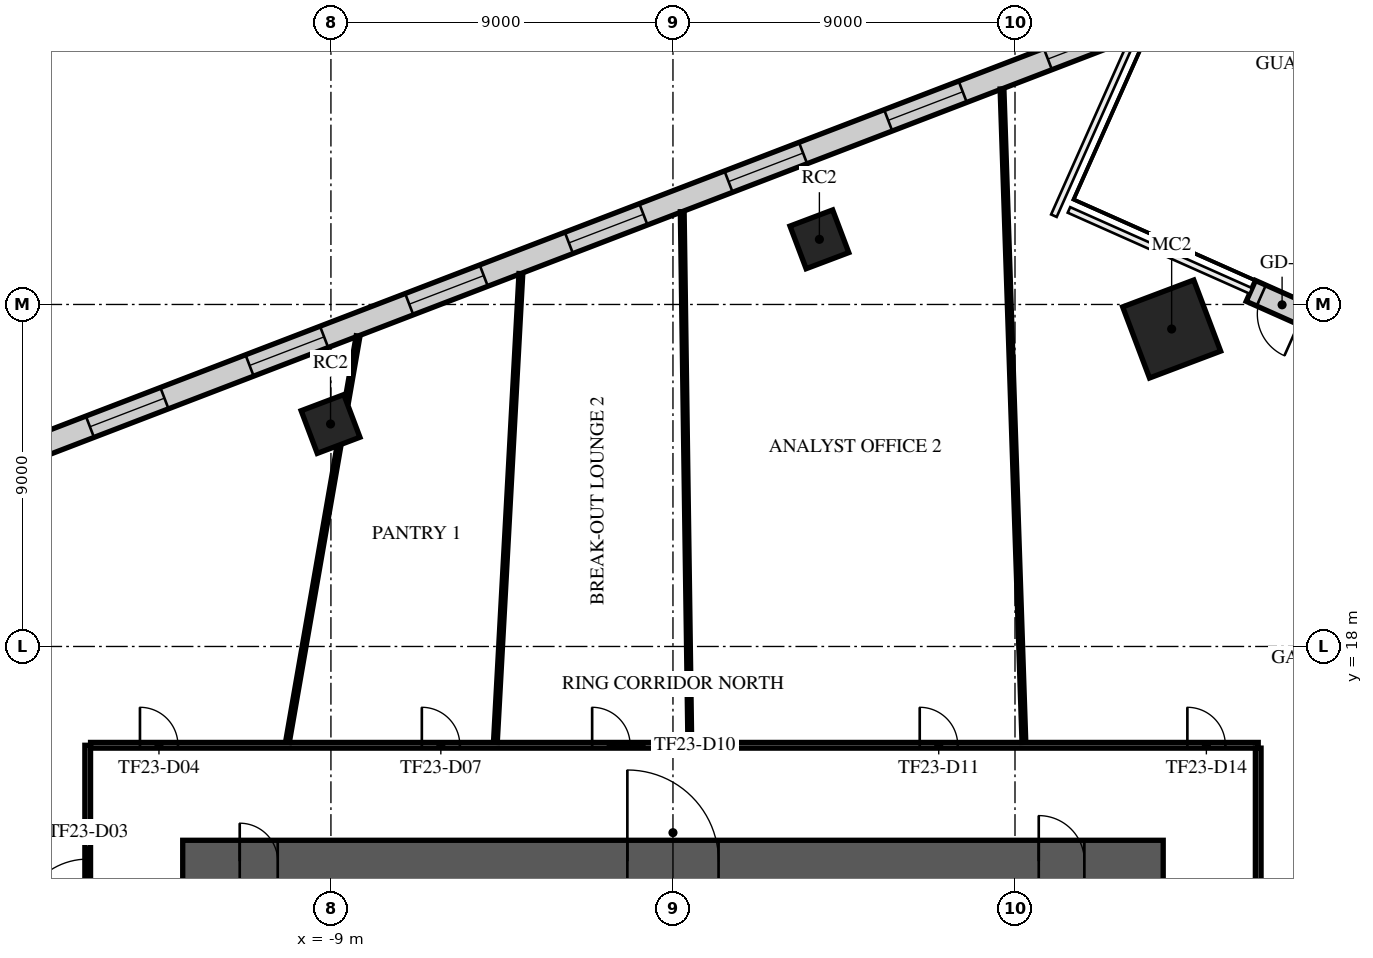
"""IFC4 building model, lengths in metres.
Left out: names, types, materials, properties, quantities, classifications, styles, units other than length and angle.
Written with IfcOpenShell. Run it as: python <this file> out.ifc"""

import sys

from ifc_helpers import new_model, si_unit, direction, frame, frame_2d, origin, origin_2d, place, context, subcontext, project, spatial, rectangle, extrude, element, fill, save


model = new_model("IFC4")
c1 = context("Model", 3, precision=1e-05, world=origin(), true_north=direction((0.0, 1.0)))
c2 = subcontext(c1, "Body", "Model", "MODEL_VIEW")
j1 = project(units=[si_unit("LENGTHUNIT", "METRE"), si_unit("PLANEANGLEUNIT", "RADIAN")], contexts=[c1])
p1 = place(None, origin())
s1 = spatial("IfcSite", under=j1, at=p1, CompositionType="ELEMENT")
p2 = place(p1, origin())
s2 = spatial("IfcBuilding", under=s1, at=p2, CompositionType="ELEMENT")
p3 = place(p2, frame((0.0, 0.0, 102.1)))
s3 = spatial("IfcBuildingStorey", under=s2, at=p3, CompositionType="ELEMENT", Elevation=102.1)
p4 = place(p3, frame((13.122, 26.354, 0.0), z_axis=(0.0, 0.0, 1.0), x_axis=(0.935491525991, 0.353349125935, 0.0)))
e1 = element("IfcColumn", 1, at=p4, inside=s3, PredefinedType="COLUMN", context=c2, shape_type="SweptSolid", body=[
    extrude(rectangle(XDim=2.0, YDim=2.0, at=origin_2d()), origin(), (0.0, 0.0, 1.0), 4.0),
])
for number, where, z_axis, x_axis in (
    (2, (3.853, 28.714, 0.0), (0.0, 0.0, 1.0), (0.935, 0.353, 0.0)),
    (3, (-9.01, 23.855, 0.0), (0.0, 0.0, 1.0), (0.935, 0.353, 0.0)),
):
    element("IfcColumn", number, at=place(p3, frame(where, z_axis=z_axis, x_axis=x_axis)), inside=s3, PredefinedType="COLUMN", context=c2, shape_type="SweptSolid", body=[
        extrude(rectangle(XDim=1.2, YDim=1.2, at=origin_2d()), origin(), (0.0, 0.0, 1.0), 4.0),
    ])
p5 = place(p3, frame((-12.9, 12.35, 0.0), z_axis=(0.0, 0.0, 1.0), x_axis=(1.0, 0.0, 0.0)))
e4 = element("IfcWall", 4, at=p5, inside=s3, PredefinedType="SHEAR", context=c2, shape_type="SweptSolid", body=[
    extrude(rectangle(XDim=25.8, YDim=1.1, at=frame_2d((12.9, 0.0))), origin(), (0.0, 0.0, 1.0), 3.58),
])
p6 = place(p5, frame((11.7, 0.0, 0.0)))
e5 = element("IfcOpeningElement", 5, at=p6, cuts=e4, PredefinedType="OPENING", context=c2, shape_type="SweptSolid", body=[
    extrude(rectangle(XDim=2.4, YDim=2.4, at=frame_2d((1.2, 1.2))), frame((0.0, 0.56, 0.0), z_axis=(0.0, -1.0, 0.0), x_axis=(1.0, 0.0, 0.0)), (0.0, 0.0, 1.0), 1.12),
])
p7 = place(p5, frame((22.525, 0.0, 0.0)))
e6 = element("IfcOpeningElement", 6, at=p7, cuts=e4, PredefinedType="OPENING", context=c2, shape_type="SweptSolid", body=[
    extrude(rectangle(XDim=1.2, YDim=2.1, at=frame_2d((0.6, 1.05))), frame((0.0, 0.56, 0.0), z_axis=(0.0, -1.0, 0.0), x_axis=(1.0, 0.0, 0.0)), (0.0, 0.0, 1.0), 1.12),
])
p8 = place(p5, frame((1.5, 0.0, 0.0)))
e7 = element("IfcOpeningElement", 7, at=p8, cuts=e4, PredefinedType="OPENING", context=c2, shape_type="SweptSolid", body=[
    extrude(rectangle(XDim=1.0, YDim=2.1, at=frame_2d((0.5, 1.05))), frame((0.0, 0.56, 0.0), z_axis=(0.0, -1.0, 0.0), x_axis=(1.0, 0.0, 0.0)), (0.0, 0.0, 1.0), 1.12),
])
p9 = place(p3, frame((12.946, 34.64, 0.0), z_axis=(0.0, 0.0, 1.0), x_axis=(-0.933581036022, -0.358366361675, 0.0)))
e8 = element("IfcWall", 8, at=p9, inside=s3, PredefinedType="STANDARD", context=c2, shape_type="SweptSolid", body=[
    extrude(rectangle(XDim=49.376, YDim=0.6, at=frame_2d((24.688, 0.0))), origin(), (0.0, 0.0, 1.0), 3.58),
])
p10 = place(p9, frame((1.2, 0.0, 0.9)))
e9 = element("IfcOpeningElement", 9, at=p10, cuts=e8, PredefinedType="OPENING", context=c2, shape_type="SweptSolid", body=[
    extrude(rectangle(XDim=2.1, YDim=2.1, at=frame_2d((1.05, 1.05))), frame((0.0, 0.31, 0.0), z_axis=(0.0, -1.0, 0.0), x_axis=(1.0, 0.0, 0.0)), (0.0, 0.0, 1.0), 0.62),
])
p11 = place(p9, frame((5.7, 0.0, 0.9)))
e10 = element("IfcOpeningElement", 10, at=p11, cuts=e8, PredefinedType="OPENING", context=c2, shape_type="SweptSolid", body=[
    extrude(rectangle(XDim=2.1, YDim=2.1, at=frame_2d((1.05, 1.05))), frame((0.0, 0.31, 0.0), z_axis=(0.0, -1.0, 0.0), x_axis=(1.0, 0.0, 0.0)), (0.0, 0.0, 1.0), 0.62),
])
p12 = place(p9, frame((10.2, 0.0, 0.9)))
e11 = element("IfcOpeningElement", 11, at=p12, cuts=e8, PredefinedType="OPENING", context=c2, shape_type="SweptSolid", body=[
    extrude(rectangle(XDim=2.1, YDim=2.1, at=frame_2d((1.05, 1.05))), frame((0.0, 0.31, 0.0), z_axis=(0.0, -1.0, 0.0), x_axis=(1.0, 0.0, 0.0)), (0.0, 0.0, 1.0), 0.62),
])
p13 = place(p9, frame((14.7, 0.0, 0.9)))
e12 = element("IfcOpeningElement", 12, at=p13, cuts=e8, PredefinedType="OPENING", context=c2, shape_type="SweptSolid", body=[
    extrude(rectangle(XDim=2.1, YDim=2.1, at=frame_2d((1.05, 1.05))), frame((0.0, 0.31, 0.0), z_axis=(0.0, -1.0, 0.0), x_axis=(1.0, 0.0, 0.0)), (0.0, 0.0, 1.0), 0.62),
])
p14 = place(p9, frame((19.2, 0.0, 0.9)))
e13 = element("IfcOpeningElement", 13, at=p14, cuts=e8, PredefinedType="OPENING", context=c2, shape_type="SweptSolid", body=[
    extrude(rectangle(XDim=2.1, YDim=2.1, at=frame_2d((1.05, 1.05))), frame((0.0, 0.31, 0.0), z_axis=(0.0, -1.0, 0.0), x_axis=(1.0, 0.0, 0.0)), (0.0, 0.0, 1.0), 0.62),
])
p15 = place(p9, frame((23.7, 0.0, 0.9)))
e14 = element("IfcOpeningElement", 14, at=p15, cuts=e8, PredefinedType="OPENING", context=c2, shape_type="SweptSolid", body=[
    extrude(rectangle(XDim=2.1, YDim=2.1, at=frame_2d((1.05, 1.05))), frame((0.0, 0.31, 0.0), z_axis=(0.0, -1.0, 0.0), x_axis=(1.0, 0.0, 0.0)), (0.0, 0.0, 1.0), 0.62),
])
p16 = place(p9, frame((28.2, 0.0, 0.9)))
e15 = element("IfcOpeningElement", 15, at=p16, cuts=e8, PredefinedType="OPENING", context=c2, shape_type="SweptSolid", body=[
    extrude(rectangle(XDim=2.1, YDim=2.1, at=frame_2d((1.05, 1.05))), frame((0.0, 0.31, 0.0), z_axis=(0.0, -1.0, 0.0), x_axis=(1.0, 0.0, 0.0)), (0.0, 0.0, 1.0), 0.62),
])
p17 = place(p9, frame((32.7, 0.0, 0.9)))
e16 = element("IfcOpeningElement", 16, at=p17, cuts=e8, PredefinedType="OPENING", context=c2, shape_type="SweptSolid", body=[
    extrude(rectangle(XDim=2.1, YDim=2.1, at=frame_2d((1.05, 1.05))), frame((0.0, 0.31, 0.0), z_axis=(0.0, -1.0, 0.0), x_axis=(1.0, 0.0, 0.0)), (0.0, 0.0, 1.0), 0.62),
])
p18 = place(p9, frame((37.2, 0.0, 0.9)))
e17 = element("IfcOpeningElement", 17, at=p18, cuts=e8, PredefinedType="OPENING", context=c2, shape_type="SweptSolid", body=[
    extrude(rectangle(XDim=2.1, YDim=2.1, at=frame_2d((1.05, 1.05))), frame((0.0, 0.31, 0.0), z_axis=(0.0, -1.0, 0.0), x_axis=(1.0, 0.0, 0.0)), (0.0, 0.0, 1.0), 0.62),
])
p19 = place(p9, frame((41.7, 0.0, 0.9)))
e18 = element("IfcOpeningElement", 18, at=p19, cuts=e8, PredefinedType="OPENING", context=c2, shape_type="SweptSolid", body=[
    extrude(rectangle(XDim=2.1, YDim=2.1, at=frame_2d((1.05, 1.05))), frame((0.0, 0.31, 0.0), z_axis=(0.0, -1.0, 0.0), x_axis=(1.0, 0.0, 0.0)), (0.0, 0.0, 1.0), 0.62),
])
p20 = place(p9, frame((46.138, 0.0, 0.9)))
e19 = element("IfcOpeningElement", 19, at=p20, cuts=e8, PredefinedType="OPENING", context=c2, shape_type="SweptSolid", body=[
    extrude(rectangle(XDim=2.1, YDim=2.1, at=frame_2d((1.05, 1.05))), frame((0.0, 0.31, 0.0), z_axis=(0.0, -1.0, 0.0), x_axis=(1.0, 0.0, 0.0)), (0.0, 0.0, 1.0), 0.62),
])
p21 = place(p3, frame((16.85, 26.625, 0.0), z_axis=(0.0, 0.0, 1.0), x_axis=(-0.913598891005, 0.406616608556, 0.0)))
e20 = element("IfcWall", 20, at=p21, inside=s3, PredefinedType="STANDARD", context=c2, shape_type="SweptSolid", body=[
    extrude(rectangle(XDim=1.8, YDim=0.6, at=frame_2d((0.9, 0.0))), origin(), (0.0, 0.0, 1.0), 3.58),
])
p22 = place(p21, frame((0.3, 0.0, 0.0)))
e21 = element("IfcOpeningElement", 21, at=p22, cuts=e20, PredefinedType="OPENING", context=c2, shape_type="SweptSolid", body=[
    extrude(rectangle(XDim=1.2, YDim=2.4, at=frame_2d((0.6, 1.2))), frame((0.0, 0.31, 0.0), z_axis=(0.0, -1.0, 0.0), x_axis=(1.0, 0.0, 0.0)), (0.0, 0.0, 1.0), 0.62),
])
p23 = place(p3, frame((-15.4, -15.4, 0.0), z_axis=(0.0, 0.0, 1.0), x_axis=(0.0, 1.0, 0.0)))
e22 = element("IfcWall", 22, at=p23, inside=s3, PredefinedType="PARTITIONING", context=c2, shape_type="SweptSolid", body=[
    extrude(rectangle(XDim=30.8, YDim=0.15, at=frame_2d((15.4, 0.0))), origin(), (0.0, 0.0, 1.0), 3.08),
])
p24 = place(p23, frame((21.999, 0.0, 0.0)))
e23 = element("IfcOpeningElement", 23, at=p24, cuts=e22, PredefinedType="OPENING", context=c2, shape_type="SweptSolid", body=[
    extrude(rectangle(XDim=1.0, YDim=2.1, at=frame_2d((0.5, 1.05))), frame((0.0, 0.085, 0.0), z_axis=(0.0, -1.0, 0.0), x_axis=(1.0, 0.0, 0.0)), (0.0, 0.0, 1.0), 0.17),
])
p25 = place(p23, frame((11.518, 0.0, 0.0)))
e24 = element("IfcOpeningElement", 24, at=p25, cuts=e22, PredefinedType="OPENING", context=c2, shape_type="SweptSolid", body=[
    extrude(rectangle(XDim=1.0, YDim=2.1, at=frame_2d((0.5, 1.05))), frame((0.0, 0.085, 0.0), z_axis=(0.0, -1.0, 0.0), x_axis=(1.0, 0.0, 0.0)), (0.0, 0.0, 1.0), 0.17),
])
p26 = place(p23, frame((26.005, 0.0, 0.0)))
e25 = element("IfcOpeningElement", 25, at=p26, cuts=e22, PredefinedType="OPENING", context=c2, shape_type="SweptSolid", body=[
    extrude(rectangle(XDim=1.8, YDim=2.1, at=frame_2d((0.9, 1.05))), frame((0.0, 0.085, 0.0), z_axis=(0.0, -1.0, 0.0), x_axis=(1.0, 0.0, 0.0)), (0.0, 0.0, 1.0), 0.17),
])
p27 = place(p23, frame((6.3, 0.0, 0.0)))
e26 = element("IfcOpeningElement", 26, at=p27, cuts=e22, PredefinedType="OPENING", context=c2, shape_type="SweptSolid", body=[
    extrude(rectangle(XDim=1.0, YDim=2.1, at=frame_2d((0.5, 1.05))), frame((0.0, 0.085, 0.0), z_axis=(0.0, -1.0, 0.0), x_axis=(1.0, 0.0, 0.0)), (0.0, 0.0, 1.0), 0.17),
])
p28 = place(p3, frame((-15.325, 15.4, 0.0), z_axis=(0.0, 0.0, 1.0), x_axis=(1.0, 0.0, 0.0)))
e27 = element("IfcWall", 27, at=p28, inside=s3, PredefinedType="PARTITIONING", context=c2, shape_type="SweptSolid", body=[
    extrude(rectangle(XDim=30.725, YDim=0.15, at=frame_2d((15.362, 0.0))), origin(), (0.0, 0.0, 1.0), 3.08),
])
p29 = place(p28, frame((1.3, 0.0, 0.0)))
e28 = element("IfcOpeningElement", 28, at=p29, cuts=e27, PredefinedType="OPENING", context=c2, shape_type="SweptSolid", body=[
    extrude(rectangle(XDim=1.0, YDim=2.1, at=frame_2d((0.5, 1.05))), frame((0.0, 0.085, 0.0), z_axis=(0.0, -1.0, 0.0), x_axis=(1.0, 0.0, 0.0)), (0.0, 0.0, 1.0), 0.17),
])
p30 = place(p28, frame((8.717, 0.0, 0.0)))
e29 = element("IfcOpeningElement", 29, at=p30, cuts=e27, PredefinedType="OPENING", context=c2, shape_type="SweptSolid", body=[
    extrude(rectangle(XDim=1.0, YDim=2.1, at=frame_2d((0.5, 1.05))), frame((0.0, 0.085, 0.0), z_axis=(0.0, -1.0, 0.0), x_axis=(1.0, 0.0, 0.0)), (0.0, 0.0, 1.0), 0.17),
])
p31 = place(p28, frame((13.198, 0.0, 0.0)))
e30 = element("IfcOpeningElement", 30, at=p31, cuts=e27, PredefinedType="OPENING", context=c2, shape_type="SweptSolid", body=[
    extrude(rectangle(XDim=1.0, YDim=2.1, at=frame_2d((0.5, 1.05))), frame((0.0, 0.085, 0.0), z_axis=(0.0, -1.0, 0.0), x_axis=(1.0, 0.0, 0.0)), (0.0, 0.0, 1.0), 0.17),
])
p32 = place(p28, frame((21.818, 0.0, 0.0)))
e31 = element("IfcOpeningElement", 31, at=p32, cuts=e27, PredefinedType="OPENING", context=c2, shape_type="SweptSolid", body=[
    extrude(rectangle(XDim=1.0, YDim=2.1, at=frame_2d((0.5, 1.05))), frame((0.0, 0.085, 0.0), z_axis=(0.0, -1.0, 0.0), x_axis=(1.0, 0.0, 0.0)), (0.0, 0.0, 1.0), 0.17),
])
p33 = place(p28, frame((28.861, 0.0, 0.0)))
e32 = element("IfcOpeningElement", 32, at=p33, cuts=e27, PredefinedType="OPENING", context=c2, shape_type="SweptSolid", body=[
    extrude(rectangle(XDim=1.0, YDim=2.1, at=frame_2d((0.5, 1.05))), frame((0.0, 0.085, 0.0), z_axis=(0.0, -1.0, 0.0), x_axis=(1.0, 0.0, 0.0)), (0.0, 0.0, 1.0), 0.17),
])
p34 = place(p3, frame((15.4, -15.325, 0.0), z_axis=(0.0, 0.0, 1.0), x_axis=(0.0, 1.0, 0.0)))
e33 = element("IfcWall", 33, at=p34, inside=s3, PredefinedType="PARTITIONING", context=c2, shape_type="SweptSolid", body=[
    extrude(rectangle(XDim=30.65, YDim=0.15, at=frame_2d((15.325, 0.0))), origin(), (0.0, 0.0, 1.0), 3.08),
])
p35 = place(p34, frame((23.606, 0.0, 0.0)))
e34 = element("IfcOpeningElement", 34, at=p35, cuts=e33, PredefinedType="OPENING", context=c2, shape_type="SweptSolid", body=[
    extrude(rectangle(XDim=1.8, YDim=2.1, at=frame_2d((0.9, 1.05))), frame((0.0, 0.085, 0.0), z_axis=(0.0, -1.0, 0.0), x_axis=(1.0, 0.0, 0.0)), (0.0, 0.0, 1.0), 0.17),
])
p36 = place(p34, frame((2.05, 0.0, 0.0)))
e35 = element("IfcOpeningElement", 35, at=p36, cuts=e33, PredefinedType="OPENING", context=c2, shape_type="SweptSolid", body=[
    extrude(rectangle(XDim=1.0, YDim=2.1, at=frame_2d((0.5, 1.05))), frame((0.0, 0.085, 0.0), z_axis=(0.0, -1.0, 0.0), x_axis=(1.0, 0.0, 0.0)), (0.0, 0.0, 1.0), 0.17),
])
p37 = place(p34, frame((13.822, 0.0, 0.0)))
e36 = element("IfcOpeningElement", 36, at=p37, cuts=e33, PredefinedType="OPENING", context=c2, shape_type="SweptSolid", body=[
    extrude(rectangle(XDim=1.0, YDim=2.1, at=frame_2d((0.5, 1.05))), frame((0.0, 0.085, 0.0), z_axis=(0.0, -1.0, 0.0), x_axis=(1.0, 0.0, 0.0)), (0.0, 0.0, 1.0), 0.17),
])
p38 = place(p34, frame((7.306, 0.0, 0.0)))
e37 = element("IfcOpeningElement", 37, at=p38, cuts=e33, PredefinedType="OPENING", context=c2, shape_type="SweptSolid", body=[
    extrude(rectangle(XDim=1.0, YDim=2.1, at=frame_2d((0.5, 1.05))), frame((0.0, 0.085, 0.0), z_axis=(0.0, -1.0, 0.0), x_axis=(1.0, 0.0, 0.0)), (0.0, 0.0, 1.0), 0.17),
])
p39 = place(p3, frame((-10.144, 15.484, 0.0), z_axis=(0.0, 0.0, 1.0), x_axis=(0.17128272341, 0.985221918484, 0.0)))
e38 = element("IfcWall", 38, at=p39, inside=s3, PredefinedType="PARTITIONING", context=c2, shape_type="SweptSolid", body=[
    extrude(rectangle(XDim=7.932, YDim=0.1, at=frame_2d((3.966, 0.0))), origin(), (0.0, 0.0, 1.0), 2.96),
])
p40 = place(p3, frame((-8.587, 24.434, 0.0), z_axis=(0.0, 0.0, 1.0), x_axis=(0.171329456072, 0.985213792779, 0.0)))
e39 = element("IfcWall", 39, at=p40, inside=s3, PredefinedType="PARTITIONING", context=c2, shape_type="SweptSolid", body=[
    extrude(rectangle(XDim=1.758, YDim=0.1, at=frame_2d((0.879, 0.0))), origin(), (0.0, 0.0, 1.0), 3.58),
])
p41 = place(p3, frame((-4.673, 15.478, 0.0), z_axis=(0.0, 0.0, 1.0), x_axis=(0.054336931842, 0.998522657649, 0.0)))
e40 = element("IfcWall", 40, at=p41, inside=s3, PredefinedType="PARTITIONING", context=c2, shape_type="SweptSolid", body=[
    extrude(rectangle(XDim=12.352, YDim=0.1, at=frame_2d((6.176, 0.0))), origin(), (0.0, 0.0, 1.0), 2.83),
])
p42 = place(p3, frame((0.244, 29.441, 0.0), z_axis=(0.0, 0.0, 1.0), x_axis=(0.014228831068, -0.999898765059, 0.0)))
e41 = element("IfcWall", 41, at=p42, inside=s3, PredefinedType="PARTITIONING", context=c2, shape_type="SweptSolid", body=[
    extrude(rectangle(XDim=13.967, YDim=0.1, at=frame_2d((6.983, 0.0))), origin(), (0.0, 0.0, 1.0), 2.83),
])
p43 = place(p3, frame((8.658, 32.671, 0.0), z_axis=(0.0, 0.0, 1.0), x_axis=(0.033491076988, -0.99943901653, 0.0)))
e42 = element("IfcWall", 42, at=p43, inside=s3, PredefinedType="PARTITIONING", context=c2, shape_type="SweptSolid", body=[
    extrude(rectangle(XDim=17.204, YDim=0.1, at=frame_2d((8.602, 0.0))), origin(), (0.0, 0.0, 1.0), 2.83),
])
p44 = place(p6, origin())
e43 = element("IfcDoor", 43, at=p44, inside=s3, OperationType="SINGLE_SWING_LEFT", PredefinedType="DOOR", context=c2, shape_type="SweptSolid", body=[
    extrude(rectangle(XDim=2.4, YDim=2.4, at=frame_2d((1.2, 1.2))), frame((0.0, 0.025, 0.0), z_axis=(0.0, -1.0, 0.0), x_axis=(1.0, 0.0, 0.0)), (0.0, 0.0, 1.0), 0.05),
])
fill(e5, e43)
p45 = place(p7, origin())
e44 = element("IfcDoor", 44, at=p45, inside=s3, OperationType="SINGLE_SWING_LEFT", PredefinedType="DOOR", context=c2, shape_type="SweptSolid", body=[
    extrude(rectangle(XDim=1.2, YDim=2.1, at=frame_2d((0.6, 1.05))), frame((0.0, 0.025, 0.0), z_axis=(0.0, -1.0, 0.0), x_axis=(1.0, 0.0, 0.0)), (0.0, 0.0, 1.0), 0.05),
])
fill(e6, e44)
p46 = place(p8, origin())
e45 = element("IfcDoor", 45, at=p46, inside=s3, OperationType="SINGLE_SWING_LEFT", PredefinedType="DOOR", context=c2, shape_type="SweptSolid", body=[
    extrude(rectangle(XDim=1.0, YDim=2.1, at=frame_2d((0.5, 1.05))), frame((0.0, 0.025, 0.0), z_axis=(0.0, -1.0, 0.0), x_axis=(1.0, 0.0, 0.0)), (0.0, 0.0, 1.0), 0.05),
])
fill(e7, e45)
p47 = place(p10, origin())
e46 = element("IfcWindow", 46, at=p47, inside=s3, PartitioningType="SINGLE_PANEL", PredefinedType="WINDOW", context=c2, shape_type="SweptSolid", body=[
    extrude(rectangle(XDim=2.1, YDim=2.1, at=frame_2d((1.05, 1.05))), frame((0.0, 0.03, 0.0), z_axis=(0.0, -1.0, 0.0), x_axis=(1.0, 0.0, 0.0)), (0.0, 0.0, 1.0), 0.06),
])
fill(e9, e46)
p48 = place(p11, origin())
e47 = element("IfcWindow", 47, at=p48, inside=s3, PartitioningType="SINGLE_PANEL", PredefinedType="WINDOW", context=c2, shape_type="SweptSolid", body=[
    extrude(rectangle(XDim=2.1, YDim=2.1, at=frame_2d((1.05, 1.05))), frame((0.0, 0.03, 0.0), z_axis=(0.0, -1.0, 0.0), x_axis=(1.0, 0.0, 0.0)), (0.0, 0.0, 1.0), 0.06),
])
fill(e10, e47)
p49 = place(p12, origin())
e48 = element("IfcWindow", 48, at=p49, inside=s3, PartitioningType="SINGLE_PANEL", PredefinedType="WINDOW", context=c2, shape_type="SweptSolid", body=[
    extrude(rectangle(XDim=2.1, YDim=2.1, at=frame_2d((1.05, 1.05))), frame((0.0, 0.03, 0.0), z_axis=(0.0, -1.0, 0.0), x_axis=(1.0, 0.0, 0.0)), (0.0, 0.0, 1.0), 0.06),
])
fill(e11, e48)
p50 = place(p13, origin())
e49 = element("IfcWindow", 49, at=p50, inside=s3, PartitioningType="SINGLE_PANEL", PredefinedType="WINDOW", context=c2, shape_type="SweptSolid", body=[
    extrude(rectangle(XDim=2.1, YDim=2.1, at=frame_2d((1.05, 1.05))), frame((0.0, 0.03, 0.0), z_axis=(0.0, -1.0, 0.0), x_axis=(1.0, 0.0, 0.0)), (0.0, 0.0, 1.0), 0.06),
])
fill(e12, e49)
p51 = place(p14, origin())
e50 = element("IfcWindow", 50, at=p51, inside=s3, PartitioningType="SINGLE_PANEL", PredefinedType="WINDOW", context=c2, shape_type="SweptSolid", body=[
    extrude(rectangle(XDim=2.1, YDim=2.1, at=frame_2d((1.05, 1.05))), frame((0.0, 0.03, 0.0), z_axis=(0.0, -1.0, 0.0), x_axis=(1.0, 0.0, 0.0)), (0.0, 0.0, 1.0), 0.06),
])
fill(e13, e50)
p52 = place(p15, origin())
e51 = element("IfcWindow", 51, at=p52, inside=s3, PartitioningType="SINGLE_PANEL", PredefinedType="WINDOW", context=c2, shape_type="SweptSolid", body=[
    extrude(rectangle(XDim=2.1, YDim=2.1, at=frame_2d((1.05, 1.05))), frame((0.0, 0.03, 0.0), z_axis=(0.0, -1.0, 0.0), x_axis=(1.0, 0.0, 0.0)), (0.0, 0.0, 1.0), 0.06),
])
fill(e14, e51)
p53 = place(p16, origin())
e52 = element("IfcWindow", 52, at=p53, inside=s3, PartitioningType="SINGLE_PANEL", PredefinedType="WINDOW", context=c2, shape_type="SweptSolid", body=[
    extrude(rectangle(XDim=2.1, YDim=2.1, at=frame_2d((1.05, 1.05))), frame((0.0, 0.03, 0.0), z_axis=(0.0, -1.0, 0.0), x_axis=(1.0, 0.0, 0.0)), (0.0, 0.0, 1.0), 0.06),
])
fill(e15, e52)
p54 = place(p22, origin())
e53 = element("IfcDoor", 53, at=p54, inside=s3, OperationType="SINGLE_SWING_LEFT", PredefinedType="DOOR", context=c2, shape_type="SweptSolid", body=[
    extrude(rectangle(XDim=1.2, YDim=2.4, at=frame_2d((0.6, 1.2))), frame((0.0, 0.025, 0.0), z_axis=(0.0, -1.0, 0.0), x_axis=(1.0, 0.0, 0.0)), (0.0, 0.0, 1.0), 0.05),
])
fill(e21, e53)
p55 = place(p26, origin())
e54 = element("IfcDoor", 54, at=p55, inside=s3, OperationType="DOUBLE_DOOR_SINGLE_SWING", PredefinedType="DOOR", context=c2, shape_type="SweptSolid", body=[
    extrude(rectangle(XDim=1.8, YDim=2.1, at=frame_2d((0.9, 1.05))), frame((0.0, 0.025, 0.0), z_axis=(0.0, -1.0, 0.0), x_axis=(1.0, 0.0, 0.0)), (0.0, 0.0, 1.0), 0.05),
])
fill(e25, e54)
p56 = place(p29, origin())
e55 = element("IfcDoor", 55, at=p56, inside=s3, OperationType="SINGLE_SWING_RIGHT", PredefinedType="DOOR", context=c2, shape_type="SweptSolid", body=[
    extrude(rectangle(XDim=1.0, YDim=2.1, at=frame_2d((0.5, 1.05))), frame((0.0, 0.025, 0.0), z_axis=(0.0, -1.0, 0.0), x_axis=(1.0, 0.0, 0.0)), (0.0, 0.0, 1.0), 0.05),
])
fill(e28, e55)
p57 = place(p30, origin())
e56 = element("IfcDoor", 56, at=p57, inside=s3, OperationType="SINGLE_SWING_LEFT", PredefinedType="DOOR", context=c2, shape_type="SweptSolid", body=[
    extrude(rectangle(XDim=1.0, YDim=2.1, at=frame_2d((0.5, 1.05))), frame((0.0, 0.025, 0.0), z_axis=(0.0, -1.0, 0.0), x_axis=(1.0, 0.0, 0.0)), (0.0, 0.0, 1.0), 0.05),
])
fill(e29, e56)
p58 = place(p31, origin())
e57 = element("IfcDoor", 57, at=p58, inside=s3, OperationType="SINGLE_SWING_LEFT", PredefinedType="DOOR", context=c2, shape_type="SweptSolid", body=[
    extrude(rectangle(XDim=1.0, YDim=2.1, at=frame_2d((0.5, 1.05))), frame((0.0, 0.025, 0.0), z_axis=(0.0, -1.0, 0.0), x_axis=(1.0, 0.0, 0.0)), (0.0, 0.0, 1.0), 0.05),
])
fill(e30, e57)
p59 = place(p32, origin())
e58 = element("IfcDoor", 58, at=p59, inside=s3, OperationType="SINGLE_SWING_LEFT", PredefinedType="DOOR", context=c2, shape_type="SweptSolid", body=[
    extrude(rectangle(XDim=1.0, YDim=2.1, at=frame_2d((0.5, 1.05))), frame((0.0, 0.025, 0.0), z_axis=(0.0, -1.0, 0.0), x_axis=(1.0, 0.0, 0.0)), (0.0, 0.0, 1.0), 0.05),
])
fill(e31, e58)
p60 = place(p33, origin())
e59 = element("IfcDoor", 59, at=p60, inside=s3, OperationType="SINGLE_SWING_LEFT", PredefinedType="DOOR", context=c2, shape_type="SweptSolid", body=[
    extrude(rectangle(XDim=1.0, YDim=2.1, at=frame_2d((0.5, 1.05))), frame((0.0, 0.025, 0.0), z_axis=(0.0, -1.0, 0.0), x_axis=(1.0, 0.0, 0.0)), (0.0, 0.0, 1.0), 0.05),
])
fill(e32, e59)
save(model, sys.argv[1])
